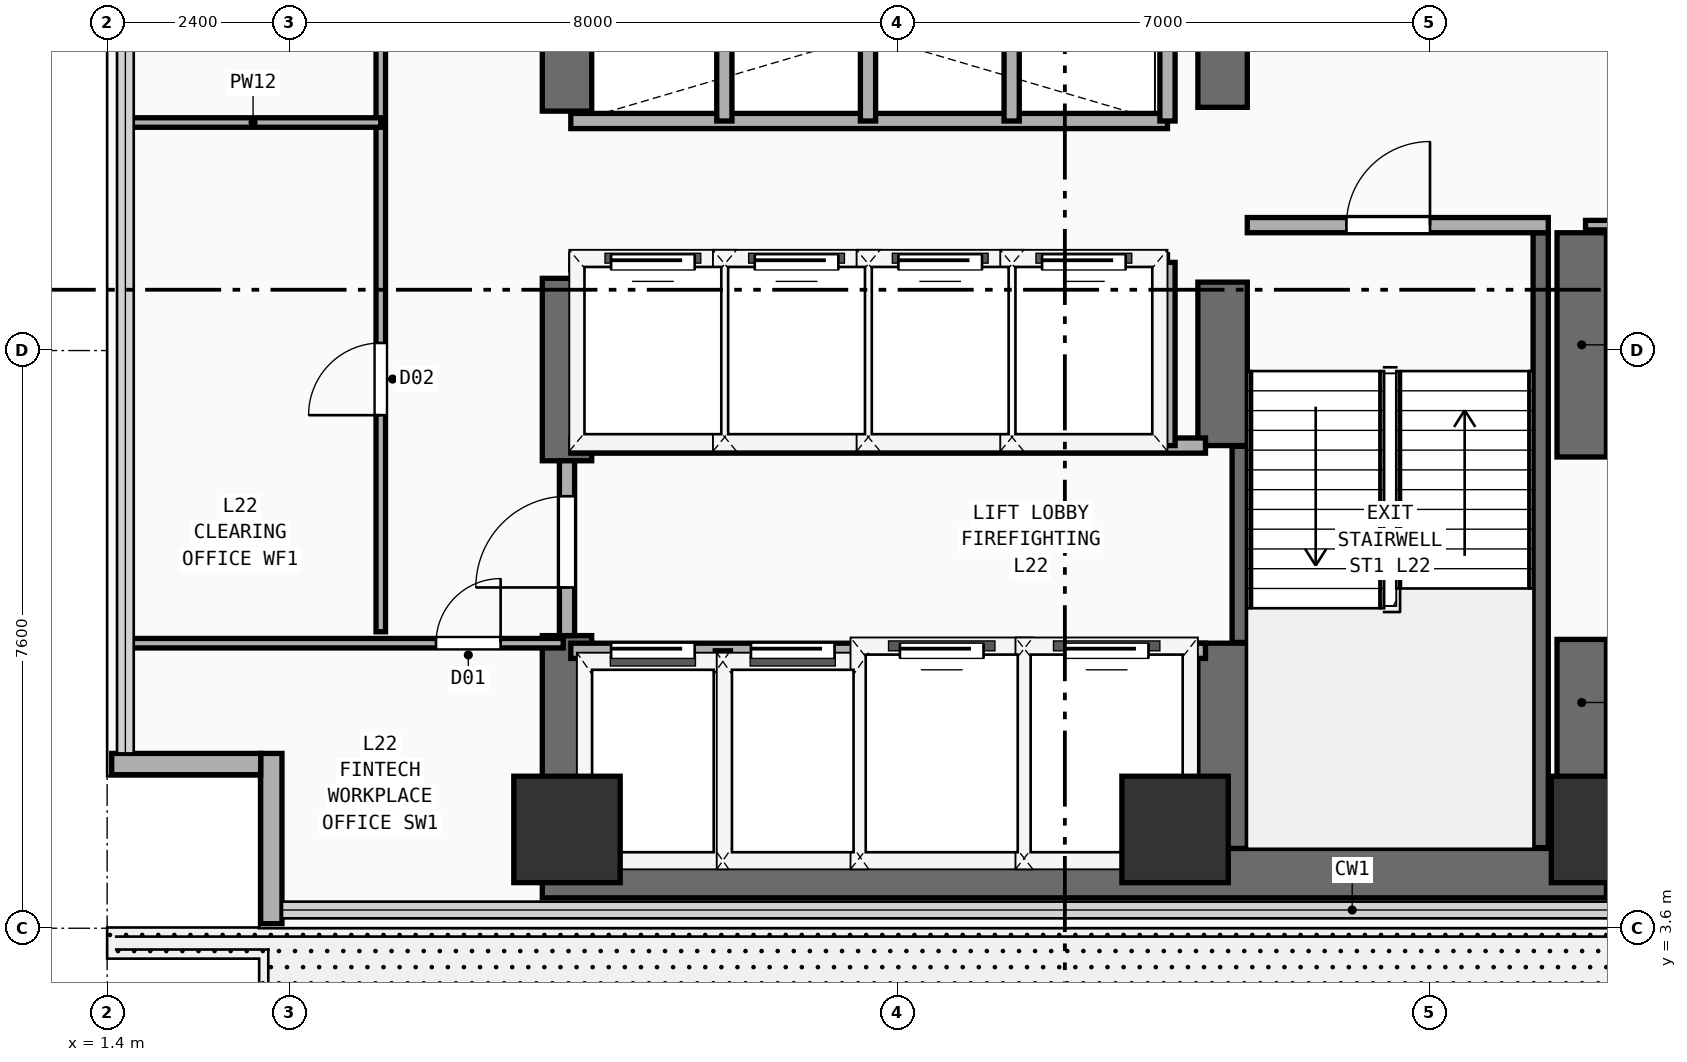
"""IFC4 building model, lengths in metres.
Left out: names, types, materials, properties, quantities, classifications, styles, units other than length and angle.
Written with IfcOpenShell. Run it as: python <this file> out.ifc"""

import sys

from ifc_helpers import new_model, si_unit, direction, frame, frame_2d, origin, origin_2d, place, context, subcontext, project, spatial, rectangle, extrude, element, fill, save


model = new_model("IFC4")
c1 = context("Model", 3, precision=1e-05, world=origin(), true_north=direction((0.0, 1.0)))
c2 = subcontext(c1, "Body", "Model", "MODEL_VIEW")
j1 = project(units=[si_unit("LENGTHUNIT", "METRE"), si_unit("PLANEANGLEUNIT", "RADIAN")], contexts=[c1])
p1 = place(None, origin())
s1 = spatial("IfcSite", under=j1, at=p1, CompositionType="ELEMENT")
p2 = place(p1, origin())
s2 = spatial("IfcBuilding", under=s1, at=p2, CompositionType="ELEMENT")
p3 = place(p2, frame((0.0, 0.0, 87.9)))
s3 = spatial("IfcBuildingStorey", under=s2, at=p3, CompositionType="ELEMENT", Elevation=87.9)
p4 = place(p3, frame((7.125, 4.325, 0.0), z_axis=(0.0, 0.0, 1.0), x_axis=(1.0, 0.0, 0.0)))
e1 = element("IfcWall", 1, at=p4, inside=s3, PredefinedType="SHEAR", context=c2, shape_type="SweptSolid", body=[
    extrude(rectangle(XDim=14.0, YDim=0.65, at=frame_2d((7.0, 0.0))), origin(), (0.0, 0.0, 1.0), 3.54),
])
p5 = place(p3, frame((7.45, 4.65, 0.0), z_axis=(0.0, 0.0, 1.0), x_axis=(0.0, 1.0, 0.0)))
e2 = element("IfcWall", 2, at=p5, inside=s3, PredefinedType="SHEAR", context=c2, shape_type="SweptSolid", body=[
    extrude(rectangle(XDim=2.8, YDim=0.65, at=frame_2d((1.4, 0.0))), origin(), (0.0, 0.0, 1.0), 3.54),
])
p6 = place(p3, frame((7.45, 9.75, 0.0), z_axis=(0.0, 0.0, 1.0), x_axis=(0.0, 1.0, 0.0)))
e3 = element("IfcWall", 3, at=p6, inside=s3, PredefinedType="SHEAR", context=c2, shape_type="SweptSolid", body=[
    extrude(rectangle(XDim=2.4, YDim=0.65, at=frame_2d((1.2, 0.0))), origin(), (0.0, 0.0, 1.0), 3.54),
])
p7 = place(p3, frame((7.45, 14.35, 0.0), z_axis=(0.0, 0.0, 1.0), x_axis=(0.0, 1.0, 0.0)))
e4 = element("IfcWall", 4, at=p7, inside=s3, PredefinedType="SHEAR", context=c2, shape_type="SweptSolid", body=[
    extrude(rectangle(XDim=4.81, YDim=0.65, at=frame_2d((2.405, 0.0))), origin(), (0.0, 0.0, 1.0), 3.54),
])
p8 = place(p3, frame((20.8, 4.65, 0.0), z_axis=(0.0, 0.0, 1.0), x_axis=(0.0, 1.0, 0.0)))
e5 = element("IfcWall", 5, at=p8, inside=s3, PredefinedType="SHEAR", context=c2, shape_type="SweptSolid", body=[
    extrude(rectangle(XDim=2.75, YDim=0.65, at=frame_2d((1.375, 0.0))), origin(), (0.0, 0.0, 1.0), 3.54),
])
p9 = place(p3, frame((20.8, 9.8, 0.0), z_axis=(0.0, 0.0, 1.0), x_axis=(0.0, 1.0, 0.0)))
e6 = element("IfcWall", 6, at=p9, inside=s3, PredefinedType="SHEAR", context=c2, shape_type="SweptSolid", body=[
    extrude(rectangle(XDim=2.95, YDim=0.65, at=frame_2d((1.475, 0.0))), origin(), (0.0, 0.0, 1.0), 3.54),
])
p10 = place(p3, frame((16.075, 4.65, 0.0), z_axis=(0.0, 0.0, 1.0), x_axis=(0.0, 1.0, 0.0)))
e7 = element("IfcWall", 7, at=p10, inside=s3, PredefinedType="SHEAR", context=c2, shape_type="SweptSolid", body=[
    extrude(rectangle(XDim=2.7, YDim=0.65, at=frame_2d((1.35, 0.0))), origin(), (0.0, 0.0, 1.0), 3.54),
])
p11 = place(p3, frame((16.075, 9.95, 0.0), z_axis=(0.0, 0.0, 1.0), x_axis=(0.0, 1.0, 0.0)))
e8 = element("IfcWall", 8, at=p11, inside=s3, PredefinedType="SHEAR", context=c2, shape_type="SweptSolid", body=[
    extrude(rectangle(XDim=2.15, YDim=0.65, at=frame_2d((1.075, 0.0))), origin(), (0.0, 0.0, 1.0), 3.54),
])
p12 = place(p3, frame((16.075, 14.4, 0.0), z_axis=(0.0, 0.0, 1.0), x_axis=(0.0, 1.0, 0.0)))
e9 = element("IfcWall", 9, at=p12, inside=s3, PredefinedType="SHEAR", context=c2, shape_type="SweptSolid", body=[
    extrude(rectangle(XDim=9.1, YDim=0.65, at=frame_2d((4.55, 0.0))), origin(), (0.0, 0.0, 1.0), 3.54),
])
for number, where, z_axis, x_axis in (
    (10, (7.45, 4.9, 0.0), (0.0, 0.0, 1.0), (1.0, 0.0, 0.0)),
    (11, (15.45, 4.9, 0.0), (0.0, 0.0, 1.0), (1.0, 0.0, 0.0)),
    (12, (21.1, 4.9, 0.0), (0.0, 0.0, 1.0), (1.0, 0.0, 0.0)),
):
    element("IfcColumn", number, at=place(p3, frame(where, z_axis=z_axis, x_axis=x_axis)), inside=s3, PredefinedType="COLUMN", context=c2, shape_type="SweptSolid", body=[
        extrude(rectangle(XDim=1.4, YDim=1.4, at=origin_2d()), origin(), (0.0, 0.0, 1.0), 3.54),
    ])
p13 = place(p3, frame((3.56, 3.66, 0.0), z_axis=(0.0, 0.0, 1.0), x_axis=(0.0, 1.0, 0.0)))
e13 = element("IfcWall", 13, at=p13, inside=s3, PredefinedType="SOLIDWALL", context=c2, shape_type="SweptSolid", body=[
    extrude(rectangle(XDim=2.24, YDim=0.28, at=frame_2d((1.12, 0.0))), origin(), (0.0, 0.0, 1.0), 3.54),
])
p14 = place(p3, frame((1.46, 5.76, 0.0), z_axis=(0.0, 0.0, 1.0), x_axis=(1.0, 0.0, 0.0)))
e14 = element("IfcWall", 14, at=p14, inside=s3, PredefinedType="SOLIDWALL", context=c2, shape_type="SweptSolid", body=[
    extrude(rectangle(XDim=1.96, YDim=0.28, at=frame_2d((0.98, 0.0))), origin(), (0.0, 0.0, 1.0), 3.54),
])
p15 = place(p3, frame((16.3, 7.36, 0.0), z_axis=(0.0, 0.0, 1.0), x_axis=(0.0, 1.0, 0.0)))
e15 = element("IfcWall", 15, at=p15, inside=s3, PredefinedType="SHEAR", context=c2, shape_type="SweptSolid", body=[
    extrude(rectangle(XDim=2.58, YDim=0.2, at=frame_2d((1.29, 0.0))), origin(), (0.0, 0.0, 1.0), 3.54),
])
p16 = place(p3, frame((20.26, 4.66, 0.0), z_axis=(0.0, 0.0, 1.0), x_axis=(0.0, 1.0, 0.0)))
e16 = element("IfcWall", 16, at=p16, inside=s3, PredefinedType="SHEAR", context=c2, shape_type="SweptSolid", body=[
    extrude(rectangle(XDim=8.09, YDim=0.2, at=frame_2d((4.045, 0.0))), origin(), (0.0, 0.0, 1.0), 3.54),
])
p17 = place(p3, frame((16.4, 12.85, 0.0), z_axis=(0.0, 0.0, 1.0), x_axis=(1.0, 0.0, 0.0)))
e17 = element("IfcWall", 17, at=p17, inside=s3, PredefinedType="PARTITIONING", context=c2, shape_type="SweptSolid", body=[
    extrude(rectangle(XDim=3.96, YDim=0.2, at=frame_2d((1.98, 0.0))), origin(), (0.0, 0.0, 1.0), 3.54),
])
p18 = place(p17, frame((1.304, 0.0, 0.0)))
e18 = element("IfcOpeningElement", 18, at=p18, cuts=e17, PredefinedType="OPENING", context=c2, shape_type="SweptSolid", body=[
    extrude(rectangle(XDim=1.1, YDim=2.2, at=frame_2d((0.55, 1.1))), frame((0.0, 0.11, 0.0), z_axis=(0.0, -1.0, 0.0), x_axis=(1.0, 0.0, 0.0)), (0.0, 0.0, 1.0), 0.22),
])
p19 = place(p3, frame((7.5, 7.25, 0.0), z_axis=(0.0, 0.0, 1.0), x_axis=(1.0, 0.0, 0.0)))
e19 = element("IfcWall", 19, at=p19, inside=s3, PredefinedType="PARTITIONING", context=c2, shape_type="SweptSolid", body=[
    extrude(rectangle(XDim=8.35, YDim=0.2, at=frame_2d((4.175, 0.0))), origin(), (0.0, 0.0, 1.0), 3.54),
])
p20 = place(p19, frame((0.53, 0.0, 0.0)))
e20 = element("IfcOpeningElement", 20, at=p20, cuts=e19, PredefinedType="OPENING", context=c2, shape_type="SweptSolid", body=[
    extrude(rectangle(XDim=1.1, YDim=2.2, at=frame_2d((0.55, 1.1))), frame((0.0, 0.11, 0.0), z_axis=(0.0, -1.0, 0.0), x_axis=(1.0, 0.0, 0.0)), (0.0, 0.0, 1.0), 0.22),
])
p21 = place(p19, frame((2.37, 0.0, 0.0)))
e21 = element("IfcOpeningElement", 21, at=p21, cuts=e19, PredefinedType="OPENING", context=c2, shape_type="SweptSolid", body=[
    extrude(rectangle(XDim=1.1, YDim=2.2, at=frame_2d((0.55, 1.1))), frame((0.0, 0.11, 0.0), z_axis=(0.0, -1.0, 0.0), x_axis=(1.0, 0.0, 0.0)), (0.0, 0.0, 1.0), 0.22),
])
p22 = place(p19, frame((4.33, 0.0, 0.0)))
e22 = element("IfcOpeningElement", 22, at=p22, cuts=e19, PredefinedType="OPENING", context=c2, shape_type="SweptSolid", body=[
    extrude(rectangle(XDim=1.1, YDim=2.2, at=frame_2d((0.55, 1.1))), frame((0.0, 0.11, 0.0), z_axis=(0.0, -1.0, 0.0), x_axis=(1.0, 0.0, 0.0)), (0.0, 0.0, 1.0), 0.22),
])
p23 = place(p19, frame((6.5, 0.0, 0.0)))
e23 = element("IfcOpeningElement", 23, at=p23, cuts=e19, PredefinedType="OPENING", context=c2, shape_type="SweptSolid", body=[
    extrude(rectangle(XDim=1.1, YDim=2.2, at=frame_2d((0.55, 1.1))), frame((0.0, 0.11, 0.0), z_axis=(0.0, -1.0, 0.0), x_axis=(1.0, 0.0, 0.0)), (0.0, 0.0, 1.0), 0.22),
])
p24 = place(p3, frame((7.5, 9.95, 0.0), z_axis=(0.0, 0.0, 1.0), x_axis=(1.0, 0.0, 0.0)))
e24 = element("IfcWall", 24, at=p24, inside=s3, PredefinedType="PARTITIONING", context=c2, shape_type="SweptSolid", body=[
    extrude(rectangle(XDim=8.35, YDim=0.2, at=frame_2d((4.175, 0.0))), origin(), (0.0, 0.0, 1.0), 3.54),
])
for number, where, z_axis, x_axis in (
    (25, (9.5, 4.45, 0.0), (0.0, 0.0, 1.0), (0.0, 1.0, 0.0)),
    (26, (11.36, 4.45, 0.0), (0.0, 0.0, 1.0), (0.0, 1.0, 0.0)),
    (27, (13.46, 4.45, 0.0), (0.0, 0.0, 1.0), (0.0, 1.0, 0.0)),
):
    element("IfcWall", number, at=place(p3, frame(where, z_axis=z_axis, x_axis=x_axis)), inside=s3, PredefinedType="PARTITIONING", context=c2, shape_type="SweptSolid", body=[
        extrude(rectangle(XDim=2.8, YDim=0.2, at=frame_2d((1.4, 0.0))), origin(), (0.0, 0.0, 1.0), 3.54),
    ])
p25 = place(p3, frame((7.45, 7.45, 0.0), z_axis=(0.0, 0.0, 1.0), x_axis=(0.0, 1.0, 0.0)))
e28 = element("IfcWall", 28, at=p25, inside=s3, PredefinedType="PARTITIONING", context=c2, shape_type="SweptSolid", body=[
    extrude(rectangle(XDim=2.3, YDim=0.2, at=frame_2d((1.15, 0.0))), origin(), (0.0, 0.0, 1.0), 2.52),
])
p26 = place(p25, frame((0.633, 0.0, 0.0)))
e29 = element("IfcOpeningElement", 29, at=p26, cuts=e28, PredefinedType="OPENING", context=c2, shape_type="SweptSolid", body=[
    extrude(rectangle(XDim=1.2, YDim=2.25, at=frame_2d((0.6, 1.125))), frame((0.0, 0.11, 0.0), z_axis=(0.0, -1.0, 0.0), x_axis=(1.0, 0.0, 0.0)), (0.0, 0.0, 1.0), 0.22),
])
p27 = place(p3, frame((7.5, 12.36, 0.0), z_axis=(0.0, 0.0, 1.0), x_axis=(1.0, 0.0, 0.0)))
e30 = element("IfcWall", 30, at=p27, inside=s3, PredefinedType="PARTITIONING", context=c2, shape_type="SweptSolid", body=[
    extrude(rectangle(XDim=7.85, YDim=0.2, at=frame_2d((3.925, 0.0))), origin(), (0.0, 0.0, 1.0), 3.54),
])
p28 = place(p27, frame((0.53, 0.0, 0.0)))
e31 = element("IfcOpeningElement", 31, at=p28, cuts=e30, PredefinedType="OPENING", context=c2, shape_type="SweptSolid", body=[
    extrude(rectangle(XDim=1.1, YDim=2.2, at=frame_2d((0.55, 1.1))), frame((0.0, 0.11, 0.0), z_axis=(0.0, -1.0, 0.0), x_axis=(1.0, 0.0, 0.0)), (0.0, 0.0, 1.0), 0.22),
])
p29 = place(p27, frame((2.42, 0.0, 0.0)))
e32 = element("IfcOpeningElement", 32, at=p29, cuts=e30, PredefinedType="OPENING", context=c2, shape_type="SweptSolid", body=[
    extrude(rectangle(XDim=1.1, YDim=2.2, at=frame_2d((0.55, 1.1))), frame((0.0, 0.11, 0.0), z_axis=(0.0, -1.0, 0.0), x_axis=(1.0, 0.0, 0.0)), (0.0, 0.0, 1.0), 0.22),
])
p30 = place(p27, frame((4.31, 0.0, 0.0)))
e33 = element("IfcOpeningElement", 33, at=p30, cuts=e30, PredefinedType="OPENING", context=c2, shape_type="SweptSolid", body=[
    extrude(rectangle(XDim=1.1, YDim=2.2, at=frame_2d((0.55, 1.1))), frame((0.0, 0.11, 0.0), z_axis=(0.0, -1.0, 0.0), x_axis=(1.0, 0.0, 0.0)), (0.0, 0.0, 1.0), 0.22),
])
p31 = place(p27, frame((6.2, 0.0, 0.0)))
e34 = element("IfcOpeningElement", 34, at=p31, cuts=e30, PredefinedType="OPENING", context=c2, shape_type="SweptSolid", body=[
    extrude(rectangle(XDim=1.1, YDim=2.2, at=frame_2d((0.55, 1.1))), frame((0.0, 0.11, 0.0), z_axis=(0.0, -1.0, 0.0), x_axis=(1.0, 0.0, 0.0)), (0.0, 0.0, 1.0), 0.22),
])
for number, where, z_axis, x_axis in (
    (35, (15.35, 9.95, 0.0), (0.0, 0.0, 1.0), (0.0, 1.0, 0.0)),
    (36, (9.52, 9.95, 0.0), (0.0, 0.0, 1.0), (0.0, 1.0, 0.0)),
    (37, (11.41, 9.95, 0.0), (0.0, 0.0, 1.0), (0.0, 1.0, 0.0)),
    (38, (13.3, 9.95, 0.0), (0.0, 0.0, 1.0), (0.0, 1.0, 0.0)),
):
    element("IfcWall", number, at=place(p3, frame(where, z_axis=z_axis, x_axis=x_axis)), inside=s3, PredefinedType="PARTITIONING", context=c2, shape_type="SweptSolid", body=[
        extrude(rectangle(XDim=2.41, YDim=0.2, at=frame_2d((1.205, 0.0))), origin(), (0.0, 0.0, 1.0), 3.54),
    ])
p32 = place(p3, frame((7.5, 14.22, 0.0), z_axis=(0.0, 0.0, 1.0), x_axis=(1.0, 0.0, 0.0)))
e39 = element("IfcWall", 39, at=p32, inside=s3, PredefinedType="PARTITIONING", context=c2, shape_type="SweptSolid", body=[
    extrude(rectangle(XDim=7.85, YDim=0.2, at=frame_2d((3.925, 0.0))), origin(), (0.0, 0.0, 1.0), 3.54),
])
for number, where, z_axis, x_axis in (
    (40, (15.35, 14.22, 0.0), (0.0, 0.0, 1.0), (0.0, 1.0, 0.0)),
    (41, (9.52, 14.22, 0.0), (0.0, 0.0, 1.0), (0.0, 1.0, 0.0)),
    (42, (11.41, 14.22, 0.0), (0.0, 0.0, 1.0), (0.0, 1.0, 0.0)),
    (43, (13.3, 14.22, 0.0), (0.0, 0.0, 1.0), (0.0, 1.0, 0.0)),
):
    element("IfcWall", number, at=place(p3, frame(where, z_axis=z_axis, x_axis=x_axis)), inside=s3, PredefinedType="PARTITIONING", context=c2, shape_type="SweptSolid", body=[
        extrude(rectangle(XDim=2.23, YDim=0.2, at=frame_2d((1.115, 0.0))), origin(), (0.0, 0.0, 1.0), 3.54),
    ])
p33 = place(p3, frame((1.64, 7.35, 0.0), z_axis=(0.0, 0.0, 1.0), x_axis=(1.0, 0.0, 0.0)))
e44 = element("IfcWall", 44, at=p33, inside=s3, PredefinedType="PARTITIONING", context=c2, shape_type="SweptSolid", body=[
    extrude(rectangle(XDim=5.76, YDim=0.125, at=frame_2d((2.88, 0.0))), origin(), (0.0, 0.0, 1.0), 3.54),
])
p34 = place(p33, frame((4.087, 0.0, 0.0)))
e45 = element("IfcOpeningElement", 45, at=p34, cuts=e44, PredefinedType="OPENING", context=c2, shape_type="SweptSolid", body=[
    extrude(rectangle(XDim=0.85, YDim=2.15, at=frame_2d((0.425, 1.075))), frame((0.0, 0.073, 0.0), z_axis=(0.0, -1.0, 0.0), x_axis=(1.0, 0.0, 0.0)), (0.0, 0.0, 1.0), 0.145),
])
p35 = place(p3, frame((5.0, 7.5, 0.0), z_axis=(0.0, 0.0, 1.0), x_axis=(0.0, 1.0, 0.0)))
e46 = element("IfcWall", 46, at=p35, inside=s3, PredefinedType="PARTITIONING", context=c2, shape_type="SweptSolid", body=[
    extrude(rectangle(XDim=17.75, YDim=0.125, at=frame_2d((8.875, 0.0))), origin(), (0.0, 0.0, 1.0), 3.54),
])
p36 = place(p35, frame((2.85, 0.0, 0.0)))
e47 = element("IfcOpeningElement", 47, at=p36, cuts=e46, PredefinedType="OPENING", context=c2, shape_type="SweptSolid", body=[
    extrude(rectangle(XDim=0.95, YDim=2.15, at=frame_2d((0.475, 1.075))), frame((0.0, 0.073, 0.0), z_axis=(0.0, -1.0, 0.0), x_axis=(1.0, 0.0, 0.0)), (0.0, 0.0, 1.0), 0.145),
])
p37 = place(p35, frame((11.821, 0.0, 0.0)))
e48 = element("IfcOpeningElement", 48, at=p37, cuts=e46, PredefinedType="OPENING", context=c2, shape_type="SweptSolid", body=[
    extrude(rectangle(XDim=0.95, YDim=2.15, at=frame_2d((0.475, 1.075))), frame((0.0, 0.073, 0.0), z_axis=(0.0, -1.0, 0.0), x_axis=(1.0, 0.0, 0.0)), (0.0, 0.0, 1.0), 0.145),
])
p38 = place(p3, frame((1.64, 14.2, 0.0), z_axis=(0.0, 0.0, 1.0), x_axis=(1.0, 0.0, 0.0)))
e49 = element("IfcWall", 49, at=p38, inside=s3, PredefinedType="PARTITIONING", context=c2, shape_type="SweptSolid", body=[
    extrude(rectangle(XDim=3.36, YDim=0.125, at=frame_2d((1.68, 0.0))), origin(), (0.0, 0.0, 1.0), 3.54),
])
p39 = place(p3, frame((20.85, 12.85, 0.0), z_axis=(0.0, 0.0, 1.0), x_axis=(1.0, 0.0, 0.0)))
e50 = element("IfcWall", 50, at=p39, inside=s3, PredefinedType="PARTITIONING", context=c2, shape_type="SweptSolid", body=[
    extrude(rectangle(XDim=7.05, YDim=0.125, at=frame_2d((3.525, 0.0))), origin(), (0.0, 0.0, 1.0), 3.54),
])
p40 = place(p39, frame((2.8, 0.0, 0.0)))
e51 = element("IfcOpeningElement", 51, at=p40, cuts=e50, PredefinedType="OPENING", context=c2, shape_type="SweptSolid", body=[
    extrude(rectangle(XDim=0.95, YDim=2.15, at=frame_2d((0.475, 1.075))), frame((0.0, 0.073, 0.0), z_axis=(0.0, -1.0, 0.0), x_axis=(1.0, 0.0, 0.0)), (0.0, 0.0, 1.0), 0.145),
])
p41 = place(p18, frame((1.1, 0.0, 0.0), z_axis=(0.0, 0.0, 1.0), x_axis=(-1.0, 0.0, 0.0)))
e52 = element("IfcDoor", 52, at=p41, inside=s3, OperationType="SINGLE_SWING_LEFT", PredefinedType="DOOR", context=c2, shape_type="SweptSolid", body=[
    extrude(rectangle(XDim=1.1, YDim=2.2, at=frame_2d((0.55, 1.1))), frame((0.0, 0.025, 0.0), z_axis=(0.0, -1.0, 0.0), x_axis=(1.0, 0.0, 0.0)), (0.0, 0.0, 1.0), 0.05),
])
fill(e18, e52)
p42 = place(p20, origin())
e53 = element("IfcDoor", 53, at=p42, inside=s3, OperationType="SLIDING_TO_LEFT", PredefinedType="DOOR", context=c2, shape_type="SweptSolid", body=[
    extrude(rectangle(XDim=1.1, YDim=2.2, at=frame_2d((0.55, 1.1))), frame((0.0, 0.025, 0.0), z_axis=(0.0, -1.0, 0.0), x_axis=(1.0, 0.0, 0.0)), (0.0, 0.0, 1.0), 0.05),
])
fill(e20, e53)
p43 = place(p21, origin())
e54 = element("IfcDoor", 54, at=p43, inside=s3, OperationType="SLIDING_TO_LEFT", PredefinedType="DOOR", context=c2, shape_type="SweptSolid", body=[
    extrude(rectangle(XDim=1.1, YDim=2.2, at=frame_2d((0.55, 1.1))), frame((0.0, 0.025, 0.0), z_axis=(0.0, -1.0, 0.0), x_axis=(1.0, 0.0, 0.0)), (0.0, 0.0, 1.0), 0.05),
])
fill(e21, e54)
p44 = place(p22, origin())
e55 = element("IfcDoor", 55, at=p44, inside=s3, OperationType="SLIDING_TO_LEFT", PredefinedType="DOOR", context=c2, shape_type="SweptSolid", body=[
    extrude(rectangle(XDim=1.1, YDim=2.2, at=frame_2d((0.55, 1.1))), frame((0.0, 0.025, 0.0), z_axis=(0.0, -1.0, 0.0), x_axis=(1.0, 0.0, 0.0)), (0.0, 0.0, 1.0), 0.05),
])
fill(e22, e55)
p45 = place(p23, origin())
e56 = element("IfcDoor", 56, at=p45, inside=s3, OperationType="SLIDING_TO_LEFT", PredefinedType="DOOR", context=c2, shape_type="SweptSolid", body=[
    extrude(rectangle(XDim=1.1, YDim=2.2, at=frame_2d((0.55, 1.1))), frame((0.0, 0.025, 0.0), z_axis=(0.0, -1.0, 0.0), x_axis=(1.0, 0.0, 0.0)), (0.0, 0.0, 1.0), 0.05),
])
fill(e23, e56)
p46 = place(p26, frame((1.2, 0.0, 0.0), z_axis=(0.0, 0.0, 1.0), x_axis=(-1.0, 0.0, 0.0)))
e57 = element("IfcDoor", 57, at=p46, inside=s3, OperationType="SINGLE_SWING_RIGHT", PredefinedType="DOOR", context=c2, shape_type="SweptSolid", body=[
    extrude(rectangle(XDim=1.2, YDim=2.25, at=frame_2d((0.6, 1.125))), frame((0.0, 0.025, 0.0), z_axis=(0.0, -1.0, 0.0), x_axis=(1.0, 0.0, 0.0)), (0.0, 0.0, 1.0), 0.05),
])
fill(e29, e57)
p47 = place(p28, origin())
e58 = element("IfcDoor", 58, at=p47, inside=s3, OperationType="SLIDING_TO_LEFT", PredefinedType="DOOR", context=c2, shape_type="SweptSolid", body=[
    extrude(rectangle(XDim=1.1, YDim=2.2, at=frame_2d((0.55, 1.1))), frame((0.0, 0.025, 0.0), z_axis=(0.0, -1.0, 0.0), x_axis=(1.0, 0.0, 0.0)), (0.0, 0.0, 1.0), 0.05),
])
fill(e31, e58)
p48 = place(p29, origin())
e59 = element("IfcDoor", 59, at=p48, inside=s3, OperationType="SLIDING_TO_LEFT", PredefinedType="DOOR", context=c2, shape_type="SweptSolid", body=[
    extrude(rectangle(XDim=1.1, YDim=2.2, at=frame_2d((0.55, 1.1))), frame((0.0, 0.025, 0.0), z_axis=(0.0, -1.0, 0.0), x_axis=(1.0, 0.0, 0.0)), (0.0, 0.0, 1.0), 0.05),
])
fill(e32, e59)
p49 = place(p30, origin())
e60 = element("IfcDoor", 60, at=p49, inside=s3, OperationType="SLIDING_TO_LEFT", PredefinedType="DOOR", context=c2, shape_type="SweptSolid", body=[
    extrude(rectangle(XDim=1.1, YDim=2.2, at=frame_2d((0.55, 1.1))), frame((0.0, 0.025, 0.0), z_axis=(0.0, -1.0, 0.0), x_axis=(1.0, 0.0, 0.0)), (0.0, 0.0, 1.0), 0.05),
])
fill(e33, e60)
p50 = place(p31, origin())
e61 = element("IfcDoor", 61, at=p50, inside=s3, OperationType="SLIDING_TO_LEFT", PredefinedType="DOOR", context=c2, shape_type="SweptSolid", body=[
    extrude(rectangle(XDim=1.1, YDim=2.2, at=frame_2d((0.55, 1.1))), frame((0.0, 0.025, 0.0), z_axis=(0.0, -1.0, 0.0), x_axis=(1.0, 0.0, 0.0)), (0.0, 0.0, 1.0), 0.05),
])
fill(e34, e61)
p51 = place(p34, origin())
e62 = element("IfcDoor", 62, at=p51, inside=s3, OperationType="SINGLE_SWING_RIGHT", PredefinedType="DOOR", context=c2, shape_type="SweptSolid", body=[
    extrude(rectangle(XDim=0.85, YDim=2.15, at=frame_2d((0.425, 1.075))), frame((0.0, 0.025, 0.0), z_axis=(0.0, -1.0, 0.0), x_axis=(1.0, 0.0, 0.0)), (0.0, 0.0, 1.0), 0.05),
])
fill(e45, e62)
p52 = place(p36, origin())
e63 = element("IfcDoor", 63, at=p52, inside=s3, OperationType="SINGLE_SWING_LEFT", PredefinedType="DOOR", context=c2, shape_type="SweptSolid", body=[
    extrude(rectangle(XDim=0.95, YDim=2.15, at=frame_2d((0.475, 1.075))), frame((0.0, 0.025, 0.0), z_axis=(0.0, -1.0, 0.0), x_axis=(1.0, 0.0, 0.0)), (0.0, 0.0, 1.0), 0.05),
])
fill(e47, e63)
save(model, sys.argv[1])
